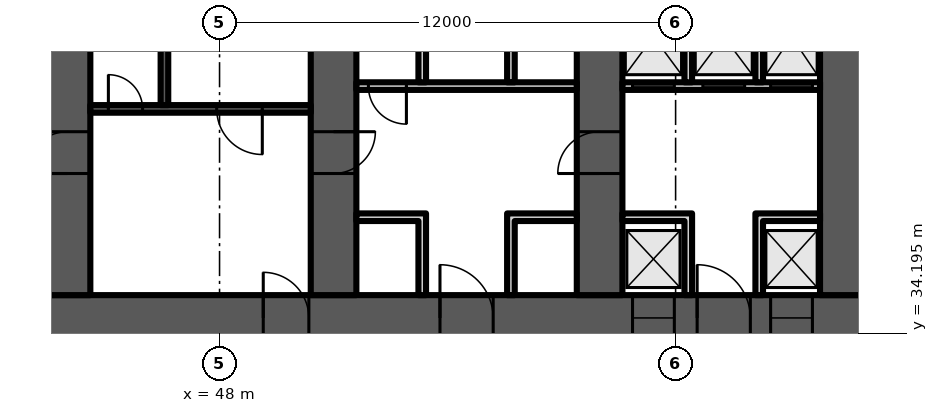
"""IFC4 building model, lengths in metres.
Left out: names, types, materials, properties, quantities, classifications, styles, units other than length and angle.
Written with IfcOpenShell. Run it as: python <this file> out.ifc"""

import sys

from ifc_helpers import new_model, si_unit, direction, frame, frame_2d, origin, place, context, subcontext, project, spatial, polyline, rectangle, outline, extrude, element, fill, save


model = new_model("IFC4")
c1 = context("Model", 3, precision=1e-05, world=origin(), true_north=direction((0.0, 1.0)))
c2 = subcontext(c1, "Body", "Model", "MODEL_VIEW")
j1 = project(units=[si_unit("LENGTHUNIT", "METRE"), si_unit("PLANEANGLEUNIT", "RADIAN")], contexts=[c1])
p1 = place(None, origin())
s1 = spatial("IfcSite", under=j1, at=p1, CompositionType="ELEMENT")
p2 = place(p1, origin())
s2 = spatial("IfcBuilding", under=s1, at=p2, CompositionType="ELEMENT")
p3 = place(p2, frame((0.0, 0.0, 70.3)))
s3 = spatial("IfcBuildingStorey", under=s2, at=p3, CompositionType="ELEMENT", Elevation=70.3)
p4 = place(p3, frame((9.0, 34.6, 0.0), z_axis=(0.0, 0.0, 1.0), x_axis=(1.0, 0.0, 0.0)))
e1 = element("IfcWall", 1, at=p4, inside=s3, PredefinedType="SHEAR", context=c2, shape_type="SweptSolid", body=[
    extrude(rectangle(XDim=56.0, YDim=1.2, at=frame_2d((28.0, 0.0))), origin(), (0.0, 0.0, 1.0), 3.6),
])
p5 = place(p4, frame((3.3, 0.0, 0.0)))
e2 = element("IfcOpeningElement", 2, at=p5, cuts=e1, PredefinedType="OPENING", context=c2, shape_type="SweptSolid", body=[
    extrude(rectangle(XDim=1.0, YDim=2.1, at=frame_2d((0.5, 1.05))), frame((0.0, 0.61, 0.0), z_axis=(0.0, -1.0, 0.0), x_axis=(1.0, 0.0, 0.0)), (0.0, 0.0, 1.0), 1.22),
])
p6 = place(p4, frame((7.867, 0.0, 0.0)))
e3 = element("IfcOpeningElement", 3, at=p6, cuts=e1, PredefinedType="OPENING", context=c2, shape_type="SweptSolid", body=[
    extrude(rectangle(XDim=1.1, YDim=2.1, at=frame_2d((0.55, 1.05))), frame((0.0, 0.61, 0.0), z_axis=(0.0, -1.0, 0.0), x_axis=(1.0, 0.0, 0.0)), (0.0, 0.0, 1.0), 1.22),
])
p7 = place(p4, frame((12.033, 0.0, 0.0)))
e4 = element("IfcOpeningElement", 4, at=p7, cuts=e1, PredefinedType="OPENING", context=c2, shape_type="SweptSolid", body=[
    extrude(rectangle(XDim=1.1, YDim=2.1, at=frame_2d((0.55, 1.05))), frame((0.0, 0.61, 0.0), z_axis=(0.0, -1.0, 0.0), x_axis=(1.0, 0.0, 0.0)), (0.0, 0.0, 1.0), 1.22),
])
p8 = place(p4, frame((9.8, 0.0, 0.0)))
e5 = element("IfcOpeningElement", 5, at=p8, cuts=e1, PredefinedType="OPENING", context=c2, shape_type="SweptSolid", body=[
    extrude(rectangle(XDim=1.4, YDim=2.1, at=frame_2d((0.7, 1.05))), frame((0.0, 0.61, 0.0), z_axis=(0.0, -1.0, 0.0), x_axis=(1.0, 0.0, 0.0)), (0.0, 0.0, 1.0), 1.22),
])
p9 = place(p4, frame((14.65, 0.0, 0.0)))
e6 = element("IfcOpeningElement", 6, at=p9, cuts=e1, PredefinedType="OPENING", context=c2, shape_type="SweptSolid", body=[
    extrude(rectangle(XDim=1.2, YDim=2.1, at=frame_2d((0.6, 1.05))), frame((0.0, 0.61, 0.0), z_axis=(0.0, -1.0, 0.0), x_axis=(1.0, 0.0, 0.0)), (0.0, 0.0, 1.0), 1.22),
])
p10 = place(p4, frame((21.867, 0.0, 0.0)))
e7 = element("IfcOpeningElement", 7, at=p10, cuts=e1, PredefinedType="OPENING", context=c2, shape_type="SweptSolid", body=[
    extrude(rectangle(XDim=1.1, YDim=2.1, at=frame_2d((0.55, 1.05))), frame((0.0, 0.61, 0.0), z_axis=(0.0, -1.0, 0.0), x_axis=(1.0, 0.0, 0.0)), (0.0, 0.0, 1.0), 1.22),
])
p11 = place(p4, frame((26.033, 0.0, 0.0)))
e8 = element("IfcOpeningElement", 8, at=p11, cuts=e1, PredefinedType="OPENING", context=c2, shape_type="SweptSolid", body=[
    extrude(rectangle(XDim=1.1, YDim=2.1, at=frame_2d((0.55, 1.05))), frame((0.0, 0.61, 0.0), z_axis=(0.0, -1.0, 0.0), x_axis=(1.0, 0.0, 0.0)), (0.0, 0.0, 1.0), 1.22),
])
p12 = place(p4, frame((23.8, 0.0, 0.0)))
e9 = element("IfcOpeningElement", 9, at=p12, cuts=e1, PredefinedType="OPENING", context=c2, shape_type="SweptSolid", body=[
    extrude(rectangle(XDim=1.4, YDim=2.1, at=frame_2d((0.7, 1.05))), frame((0.0, 0.61, 0.0), z_axis=(0.0, -1.0, 0.0), x_axis=(1.0, 0.0, 0.0)), (0.0, 0.0, 1.0), 1.22),
])
p13 = place(p4, frame((28.867, 0.0, 0.0)))
e10 = element("IfcOpeningElement", 10, at=p13, cuts=e1, PredefinedType="OPENING", context=c2, shape_type="SweptSolid", body=[
    extrude(rectangle(XDim=1.1, YDim=2.1, at=frame_2d((0.55, 1.05))), frame((0.0, 0.61, 0.0), z_axis=(0.0, -1.0, 0.0), x_axis=(1.0, 0.0, 0.0)), (0.0, 0.0, 1.0), 1.22),
])
p14 = place(p4, frame((33.033, 0.0, 0.0)))
e11 = element("IfcOpeningElement", 11, at=p14, cuts=e1, PredefinedType="OPENING", context=c2, shape_type="SweptSolid", body=[
    extrude(rectangle(XDim=1.1, YDim=2.1, at=frame_2d((0.55, 1.05))), frame((0.0, 0.61, 0.0), z_axis=(0.0, -1.0, 0.0), x_axis=(1.0, 0.0, 0.0)), (0.0, 0.0, 1.0), 1.22),
])
p15 = place(p4, frame((40.15, 0.0, 0.0)))
e12 = element("IfcOpeningElement", 12, at=p15, cuts=e1, PredefinedType="OPENING", context=c2, shape_type="SweptSolid", body=[
    extrude(rectangle(XDim=1.2, YDim=2.1, at=frame_2d((0.6, 1.05))), frame((0.0, 0.61, 0.0), z_axis=(0.0, -1.0, 0.0), x_axis=(1.0, 0.0, 0.0)), (0.0, 0.0, 1.0), 1.22),
])
p16 = place(p4, frame((44.8, 0.0, 0.0)))
e13 = element("IfcOpeningElement", 13, at=p16, cuts=e1, PredefinedType="OPENING", context=c2, shape_type="SweptSolid", body=[
    extrude(rectangle(XDim=1.4, YDim=2.1, at=frame_2d((0.7, 1.05))), frame((0.0, 0.61, 0.0), z_axis=(0.0, -1.0, 0.0), x_axis=(1.0, 0.0, 0.0)), (0.0, 0.0, 1.0), 1.22),
])
p17 = place(p4, frame((49.867, 0.0, 0.0)))
e14 = element("IfcOpeningElement", 14, at=p17, cuts=e1, PredefinedType="OPENING", context=c2, shape_type="SweptSolid", body=[
    extrude(rectangle(XDim=1.1, YDim=2.1, at=frame_2d((0.55, 1.05))), frame((0.0, 0.61, 0.0), z_axis=(0.0, -1.0, 0.0), x_axis=(1.0, 0.0, 0.0)), (0.0, 0.0, 1.0), 1.22),
])
p18 = place(p4, frame((53.5, 0.0, 0.0)))
e15 = element("IfcOpeningElement", 15, at=p18, cuts=e1, PredefinedType="OPENING", context=c2, shape_type="SweptSolid", body=[
    extrude(rectangle(XDim=1.1, YDim=2.1, at=frame_2d((0.55, 1.05))), frame((0.0, 0.61, 0.0), z_axis=(0.0, -1.0, 0.0), x_axis=(1.0, 0.0, 0.0)), (0.0, 0.0, 1.0), 1.22),
])
p19 = place(p4, frame((51.567, 0.0, 0.0)))
e16 = element("IfcOpeningElement", 16, at=p19, cuts=e1, PredefinedType="OPENING", context=c2, shape_type="SweptSolid", body=[
    extrude(rectangle(XDim=1.4, YDim=2.1, at=frame_2d((0.7, 1.05))), frame((0.0, 0.61, 0.0), z_axis=(0.0, -1.0, 0.0), x_axis=(1.0, 0.0, 0.0)), (0.0, 0.0, 1.0), 1.22),
])
p20 = place(p3, frame((44.0, 35.2, 0.0), z_axis=(0.0, 0.0, 1.0), x_axis=(0.0, 1.0, 0.0)))
e17 = element("IfcWall", 17, at=p20, inside=s3, PredefinedType="SHEAR", context=c2, shape_type="SweptSolid", body=[
    extrude(rectangle(XDim=14.168, YDim=1.2, at=frame_2d((7.084, 0.0))), origin(), (0.0, 0.0, 1.0), 3.6),
])
p21 = place(p20, frame((3.2, 0.0, 0.0)))
e18 = element("IfcOpeningElement", 18, at=p21, cuts=e17, PredefinedType="OPENING", context=c2, shape_type="SweptSolid", body=[
    extrude(rectangle(XDim=1.1, YDim=2.1, at=frame_2d((0.55, 1.05))), frame((0.0, 0.61, 0.0), z_axis=(0.0, -1.0, 0.0), x_axis=(1.0, 0.0, 0.0)), (0.0, 0.0, 1.0), 1.22),
])
p22 = place(p20, frame((9.6, 0.0, 0.0)))
e19 = element("IfcOpeningElement", 19, at=p22, cuts=e17, PredefinedType="OPENING", context=c2, shape_type="SweptSolid", body=[
    extrude(rectangle(XDim=1.0, YDim=2.1, at=frame_2d((0.5, 1.05))), frame((0.0, 0.61, 0.0), z_axis=(0.0, -1.0, 0.0), x_axis=(1.0, 0.0, 0.0)), (0.0, 0.0, 1.0), 1.22),
])
p23 = place(p3, frame((51.0, 35.2, 0.0), z_axis=(0.0, 0.0, 1.0), x_axis=(0.0, 1.0, 0.0)))
e20 = element("IfcWall", 20, at=p23, inside=s3, PredefinedType="SHEAR", context=c2, shape_type="SweptSolid", body=[
    extrude(rectangle(XDim=13.555, YDim=1.2, at=frame_2d((6.778, 0.0))), origin(), (0.0, 0.0, 1.0), 3.6),
])
p24 = place(p23, frame((3.2, 0.0, 0.0)))
e21 = element("IfcOpeningElement", 21, at=p24, cuts=e20, PredefinedType="OPENING", context=c2, shape_type="SweptSolid", body=[
    extrude(rectangle(XDim=1.1, YDim=2.1, at=frame_2d((0.55, 1.05))), frame((0.0, 0.61, 0.0), z_axis=(0.0, -1.0, 0.0), x_axis=(1.0, 0.0, 0.0)), (0.0, 0.0, 1.0), 1.22),
])
p25 = place(p3, frame((58.0, 35.2, 0.0), z_axis=(0.0, 0.0, 1.0), x_axis=(0.0, 1.0, 0.0)))
e22 = element("IfcWall", 22, at=p25, inside=s3, PredefinedType="SHEAR", context=c2, shape_type="SweptSolid", body=[
    extrude(rectangle(XDim=12.943, YDim=1.2, at=frame_2d((6.471, 0.0))), origin(), (0.0, 0.0, 1.0), 3.6),
])
p26 = place(p25, frame((10.134, 0.0, 0.0)))
e23 = element("IfcOpeningElement", 23, at=p26, cuts=e22, PredefinedType="OPENING", context=c2, shape_type="SweptSolid", body=[
    extrude(rectangle(XDim=1.0, YDim=2.1, at=frame_2d((0.5, 1.05))), frame((0.0, 0.61, 0.0), z_axis=(0.0, -1.0, 0.0), x_axis=(1.0, 0.0, 0.0)), (0.0, 0.0, 1.0), 1.22),
])
p27 = place(p25, frame((3.2, 0.0, 0.0)))
e24 = element("IfcOpeningElement", 24, at=p27, cuts=e22, PredefinedType="OPENING", context=c2, shape_type="SweptSolid", body=[
    extrude(rectangle(XDim=1.1, YDim=2.1, at=frame_2d((0.55, 1.05))), frame((0.0, 0.61, 0.0), z_axis=(0.0, -1.0, 0.0), x_axis=(1.0, 0.0, 0.0)), (0.0, 0.0, 1.0), 1.22),
])
p28 = place(p3, frame((64.4, 35.2, 0.0), z_axis=(0.0, 0.0, 1.0), x_axis=(0.0, 1.0, 0.0)))
e25 = element("IfcWall", 25, at=p28, inside=s3, PredefinedType="SHEAR", context=c2, shape_type="SweptSolid", body=[
    extrude(rectangle(XDim=12.383, YDim=1.2, at=frame_2d((6.191, 0.0))), origin(), (0.0, 0.0, 1.0), 3.6),
])
p29 = place(p3, frame((44.6, 40.1, 0.0), z_axis=(0.0, 0.0, 1.0), x_axis=(1.0, 0.0, 0.0)))
e26 = element("IfcWall", 26, at=p29, inside=s3, PredefinedType="SHEAR", context=c2, shape_type="SweptSolid", body=[
    extrude(rectangle(XDim=5.8, YDim=0.2, at=frame_2d((2.9, 0.0))), origin(), (0.0, 0.0, 1.0), 3.2),
])
p30 = place(p29, frame((3.325, 0.0, 0.0)))
e27 = element("IfcOpeningElement", 27, at=p30, cuts=e26, PredefinedType="OPENING", context=c2, shape_type="SweptSolid", body=[
    extrude(rectangle(XDim=1.2, YDim=2.1, at=frame_2d((0.6, 1.05))), frame((0.0, 0.11, 0.0), z_axis=(0.0, -1.0, 0.0), x_axis=(1.0, 0.0, 0.0)), (0.0, 0.0, 1.0), 0.22),
])
p31 = place(p29, frame((0.475, 0.0, 0.0)))
e28 = element("IfcOpeningElement", 28, at=p31, cuts=e26, PredefinedType="OPENING", context=c2, shape_type="SweptSolid", body=[
    extrude(rectangle(XDim=0.9, YDim=2.1, at=frame_2d((0.45, 1.05))), frame((0.0, 0.11, 0.0), z_axis=(0.0, -1.0, 0.0), x_axis=(1.0, 0.0, 0.0)), (0.0, 0.0, 1.0), 0.22),
])
p32 = place(p3, frame((46.55, 40.2, 0.0), z_axis=(0.0, 0.0, 1.0), x_axis=(0.0, 1.0, 0.0)))
e29 = element("IfcWall", 29, at=p32, inside=s3, PredefinedType="SHEAR", context=c2, shape_type="SweptSolid", body=[
    extrude(rectangle(XDim=7.2, YDim=0.2, at=frame_2d((3.6, 0.0))), origin(), (0.0, 0.0, 1.0), 3.2),
])
p33 = place(p3, frame((51.6, 40.7, 0.0), z_axis=(0.0, 0.0, 1.0), x_axis=(1.0, 0.0, 0.0)))
e30 = element("IfcWall", 30, at=p33, inside=s3, PredefinedType="PARTITIONING", context=c2, shape_type="SweptSolid", body=[
    extrude(rectangle(XDim=5.8, YDim=0.2, at=frame_2d((2.9, 0.0))), origin(), (0.0, 0.0, 1.0), 3.2),
])
p34 = place(p33, frame((0.317, 0.0, 0.0)))
e31 = element("IfcOpeningElement", 31, at=p34, cuts=e30, PredefinedType="OPENING", context=c2, shape_type="SweptSolid", body=[
    extrude(rectangle(XDim=1.0, YDim=2.1, at=frame_2d((0.5, 1.05))), frame((0.0, 0.11, 0.0), z_axis=(0.0, -1.0, 0.0), x_axis=(1.0, 0.0, 0.0)), (0.0, 0.0, 1.0), 0.22),
])
p35 = place(p3, frame((0.0, 0.0, -0.0)))
e32 = element("IfcWall", 32, at=p35, inside=s3, PredefinedType="PARTITIONING", context=c2, shape_type="SweptSolid", body=[
    extrude(outline(polyline([(53.233, 37.15), (51.6, 37.15), (51.6, 37.35), (53.233, 37.35), (53.433, 37.35), (53.433, 35.2), (53.233, 35.2), (53.233, 37.15)])), origin(), (0.0, 0.0, 1.0), 3.2),
])
p36 = place(p3, frame((0.0, 0.0, -0.0)))
e33 = element("IfcWall", 33, at=p36, inside=s3, PredefinedType="PARTITIONING", context=c2, shape_type="SweptSolid", body=[
    extrude(outline(polyline([(55.567, 37.35), (55.767, 37.35), (57.4, 37.35), (57.4, 37.15), (55.767, 37.15), (55.767, 35.2), (55.567, 35.2), (55.567, 37.35)])), origin(), (0.0, 0.0, 1.0), 3.2),
])
p37 = place(p3, frame((0.0, 0.0, -0.0)))
e34 = element("IfcWall", 34, at=p37, inside=s3, PredefinedType="PARTITIONING", context=c2, shape_type="SweptSolid", body=[
    extrude(outline(polyline([(53.233, 40.8), (53.233, 43.8), (53.433, 43.8), (53.433, 40.8), (53.233, 40.8)])), origin(), (0.0, 0.0, 1.0), 3.2),
])
p38 = place(p3, frame((0.0, 0.0, -0.0)))
e35 = element("IfcWall", 35, at=p38, inside=s3, PredefinedType="PARTITIONING", context=c2, shape_type="SweptSolid", body=[
    extrude(outline(polyline([(55.567, 40.8), (55.567, 43.8), (55.767, 43.8), (55.767, 40.8), (55.567, 40.8)])), origin(), (0.0, 0.0, 1.0), 3.2),
])
p39 = place(p3, frame((58.6, 40.7, 0.0), z_axis=(0.0, 0.0, 1.0), x_axis=(1.0, 0.0, 0.0)))
e36 = element("IfcWall", 36, at=p39, inside=s3, PredefinedType="PARTITIONING", context=c2, shape_type="SweptSolid", body=[
    extrude(rectangle(XDim=5.2, YDim=0.2, at=frame_2d((2.6, 0.0))), origin(), (0.0, 0.0, 1.0), 3.2),
])
p40 = place(p39, frame((0.267, 0.0, 0.0)))
e37 = element("IfcOpeningElement", 37, at=p40, cuts=e36, PredefinedType="OPENING", context=c2, shape_type="SweptSolid", body=[
    extrude(rectangle(XDim=1.1, YDim=2.1, at=frame_2d((0.55, 1.05))), frame((0.0, 0.11, 0.0), z_axis=(0.0, -1.0, 0.0), x_axis=(1.0, 0.0, 0.0)), (0.0, 0.0, 1.0), 0.22),
])
p41 = place(p39, frame((2.117, 0.0, 0.0)))
e38 = element("IfcOpeningElement", 38, at=p41, cuts=e36, PredefinedType="OPENING", context=c2, shape_type="SweptSolid", body=[
    extrude(rectangle(XDim=1.1, YDim=2.1, at=frame_2d((0.55, 1.05))), frame((0.0, 0.11, 0.0), z_axis=(0.0, -1.0, 0.0), x_axis=(1.0, 0.0, 0.0)), (0.0, 0.0, 1.0), 0.22),
])
p42 = place(p39, frame((3.9, 0.0, 0.0)))
e39 = element("IfcOpeningElement", 39, at=p42, cuts=e36, PredefinedType="OPENING", context=c2, shape_type="SweptSolid", body=[
    extrude(rectangle(XDim=1.1, YDim=2.1, at=frame_2d((0.55, 1.05))), frame((0.0, 0.11, 0.0), z_axis=(0.0, -1.0, 0.0), x_axis=(1.0, 0.0, 0.0)), (0.0, 0.0, 1.0), 0.22),
])
p43 = place(p3, frame((0.0, 0.0, -0.0)))
e40 = element("IfcWall", 40, at=p43, inside=s3, PredefinedType="PARTITIONING", context=c2, shape_type="SweptSolid", body=[
    extrude(outline(polyline([(60.233, 37.15), (58.6, 37.15), (58.6, 37.35), (60.233, 37.35), (60.433, 37.35), (60.433, 35.2), (60.233, 35.2), (60.233, 37.15)])), origin(), (0.0, 0.0, 1.0), 3.2),
])
p44 = place(p3, frame((0.0, 0.0, -0.0)))
e41 = element("IfcWall", 41, at=p44, inside=s3, PredefinedType="PARTITIONING", context=c2, shape_type="SweptSolid", body=[
    extrude(outline(polyline([(62.1, 37.35), (62.3, 37.35), (63.8, 37.35), (63.8, 37.15), (62.3, 37.15), (62.3, 35.2), (62.1, 35.2), (62.1, 37.35)])), origin(), (0.0, 0.0, 1.0), 3.2),
])
p45 = place(p3, frame((0.0, 0.0, -0.0)))
e42 = element("IfcWall", 42, at=p45, inside=s3, PredefinedType="PARTITIONING", context=c2, shape_type="SweptSolid", body=[
    extrude(outline(polyline([(60.433, 40.8), (60.233, 40.8), (60.233, 43.8), (58.6, 43.8), (58.6, 44.0), (63.8, 44.0), (63.8, 43.8), (62.3, 43.8), (62.3, 40.8), (62.1, 40.8), (62.1, 43.8), (60.433, 43.8), (60.433, 40.8)])), origin(), (0.0, 0.0, 1.0), 3.2),
])
p46 = place(p30, origin())
e43 = element("IfcDoor", 43, at=p46, inside=s3, OperationType="SINGLE_SWING_RIGHT", PredefinedType="DOOR", context=c2, shape_type="SweptSolid", body=[
    extrude(rectangle(XDim=1.2, YDim=2.1, at=frame_2d((0.6, 1.05))), frame((0.0, 0.025, 0.0), z_axis=(0.0, -1.0, 0.0), x_axis=(1.0, 0.0, 0.0)), (0.0, 0.0, 1.0), 0.05),
])
fill(e27, e43)
p47 = place(p31, origin())
e44 = element("IfcDoor", 44, at=p47, inside=s3, OperationType="SINGLE_SWING_LEFT", PredefinedType="DOOR", context=c2, shape_type="SweptSolid", body=[
    extrude(rectangle(XDim=0.9, YDim=2.1, at=frame_2d((0.45, 1.05))), frame((0.0, 0.025, 0.0), z_axis=(0.0, -1.0, 0.0), x_axis=(1.0, 0.0, 0.0)), (0.0, 0.0, 1.0), 0.05),
])
fill(e28, e44)
p48 = place(p15, origin())
e45 = element("IfcDoor", 45, at=p48, inside=s3, OperationType="SINGLE_SWING_LEFT", PredefinedType="DOOR", context=c2, shape_type="SweptSolid", body=[
    extrude(rectangle(XDim=1.2, YDim=2.1, at=frame_2d((0.6, 1.05))), frame((0.0, 0.025, 0.0), z_axis=(0.0, -1.0, 0.0), x_axis=(1.0, 0.0, 0.0)), (0.0, 0.0, 1.0), 0.05),
])
fill(e12, e45)
p49 = place(p16, origin())
e46 = element("IfcDoor", 46, at=p49, inside=s3, OperationType="DOUBLE_DOOR_SINGLE_SWING", PredefinedType="DOOR", context=c2, shape_type="SweptSolid", body=[
    extrude(rectangle(XDim=1.4, YDim=2.1, at=frame_2d((0.7, 1.05))), frame((0.0, 0.025, 0.0), z_axis=(0.0, -1.0, 0.0), x_axis=(1.0, 0.0, 0.0)), (0.0, 0.0, 1.0), 0.05),
])
fill(e13, e46)
p50 = place(p34, origin())
e47 = element("IfcDoor", 47, at=p50, inside=s3, OperationType="SINGLE_SWING_RIGHT", PredefinedType="DOOR", context=c2, shape_type="SweptSolid", body=[
    extrude(rectangle(XDim=1.0, YDim=2.1, at=frame_2d((0.5, 1.05))), frame((0.0, 0.025, 0.0), z_axis=(0.0, -1.0, 0.0), x_axis=(1.0, 0.0, 0.0)), (0.0, 0.0, 1.0), 0.05),
])
fill(e31, e47)
p51 = place(p17, origin())
e48 = element("IfcDoor", 48, at=p51, inside=s3, OperationType="DOUBLE_DOOR_SLIDING", PredefinedType="DOOR", context=c2, shape_type="SweptSolid", body=[
    extrude(rectangle(XDim=1.1, YDim=2.1, at=frame_2d((0.55, 1.05))), frame((0.0, 0.025, 0.0), z_axis=(0.0, -1.0, 0.0), x_axis=(1.0, 0.0, 0.0)), (0.0, 0.0, 1.0), 0.05),
])
fill(e14, e48)
p52 = place(p18, origin())
e49 = element("IfcDoor", 49, at=p52, inside=s3, OperationType="DOUBLE_DOOR_SLIDING", PredefinedType="DOOR", context=c2, shape_type="SweptSolid", body=[
    extrude(rectangle(XDim=1.1, YDim=2.1, at=frame_2d((0.55, 1.05))), frame((0.0, 0.025, 0.0), z_axis=(0.0, -1.0, 0.0), x_axis=(1.0, 0.0, 0.0)), (0.0, 0.0, 1.0), 0.05),
])
fill(e15, e49)
p53 = place(p19, origin())
e50 = element("IfcDoor", 50, at=p53, inside=s3, OperationType="DOUBLE_DOOR_SINGLE_SWING", PredefinedType="DOOR", context=c2, shape_type="SweptSolid", body=[
    extrude(rectangle(XDim=1.4, YDim=2.1, at=frame_2d((0.7, 1.05))), frame((0.0, 0.025, 0.0), z_axis=(0.0, -1.0, 0.0), x_axis=(1.0, 0.0, 0.0)), (0.0, 0.0, 1.0), 0.05),
])
fill(e16, e50)
p54 = place(p40, origin())
e51 = element("IfcDoor", 51, at=p54, inside=s3, OperationType="DOUBLE_DOOR_SLIDING", PredefinedType="DOOR", context=c2, shape_type="SweptSolid", body=[
    extrude(rectangle(XDim=1.1, YDim=2.1, at=frame_2d((0.55, 1.05))), frame((0.0, 0.025, 0.0), z_axis=(0.0, -1.0, 0.0), x_axis=(1.0, 0.0, 0.0)), (0.0, 0.0, 1.0), 0.05),
])
fill(e37, e51)
p55 = place(p41, origin())
e52 = element("IfcDoor", 52, at=p55, inside=s3, OperationType="DOUBLE_DOOR_SLIDING", PredefinedType="DOOR", context=c2, shape_type="SweptSolid", body=[
    extrude(rectangle(XDim=1.1, YDim=2.1, at=frame_2d((0.55, 1.05))), frame((0.0, 0.025, 0.0), z_axis=(0.0, -1.0, 0.0), x_axis=(1.0, 0.0, 0.0)), (0.0, 0.0, 1.0), 0.05),
])
fill(e38, e52)
p56 = place(p42, origin())
e53 = element("IfcDoor", 53, at=p56, inside=s3, OperationType="DOUBLE_DOOR_SLIDING", PredefinedType="DOOR", context=c2, shape_type="SweptSolid", body=[
    extrude(rectangle(XDim=1.1, YDim=2.1, at=frame_2d((0.55, 1.05))), frame((0.0, 0.025, 0.0), z_axis=(0.0, -1.0, 0.0), x_axis=(1.0, 0.0, 0.0)), (0.0, 0.0, 1.0), 0.05),
])
fill(e39, e53)
p57 = place(p21, origin())
e54 = element("IfcDoor", 54, at=p57, inside=s3, OperationType="SINGLE_SWING_LEFT", PredefinedType="DOOR", context=c2, shape_type="SweptSolid", body=[
    extrude(rectangle(XDim=1.1, YDim=2.1, at=frame_2d((0.55, 1.05))), frame((0.0, 0.025, 0.0), z_axis=(0.0, -1.0, 0.0), x_axis=(1.0, 0.0, 0.0)), (0.0, 0.0, 1.0), 0.05),
])
fill(e18, e54)
p58 = place(p24, origin())
e55 = element("IfcDoor", 55, at=p58, inside=s3, OperationType="SINGLE_SWING_RIGHT", PredefinedType="DOOR", context=c2, shape_type="SweptSolid", body=[
    extrude(rectangle(XDim=1.1, YDim=2.1, at=frame_2d((0.55, 1.05))), frame((0.0, 0.025, 0.0), z_axis=(0.0, -1.0, 0.0), x_axis=(1.0, 0.0, 0.0)), (0.0, 0.0, 1.0), 0.05),
])
fill(e21, e55)
p59 = place(p27, origin())
e56 = element("IfcDoor", 56, at=p59, inside=s3, OperationType="SINGLE_SWING_LEFT", PredefinedType="DOOR", context=c2, shape_type="SweptSolid", body=[
    extrude(rectangle(XDim=1.1, YDim=2.1, at=frame_2d((0.55, 1.05))), frame((0.0, 0.025, 0.0), z_axis=(0.0, -1.0, 0.0), x_axis=(1.0, 0.0, 0.0)), (0.0, 0.0, 1.0), 0.05),
])
fill(e24, e56)
save(model, sys.argv[1])
